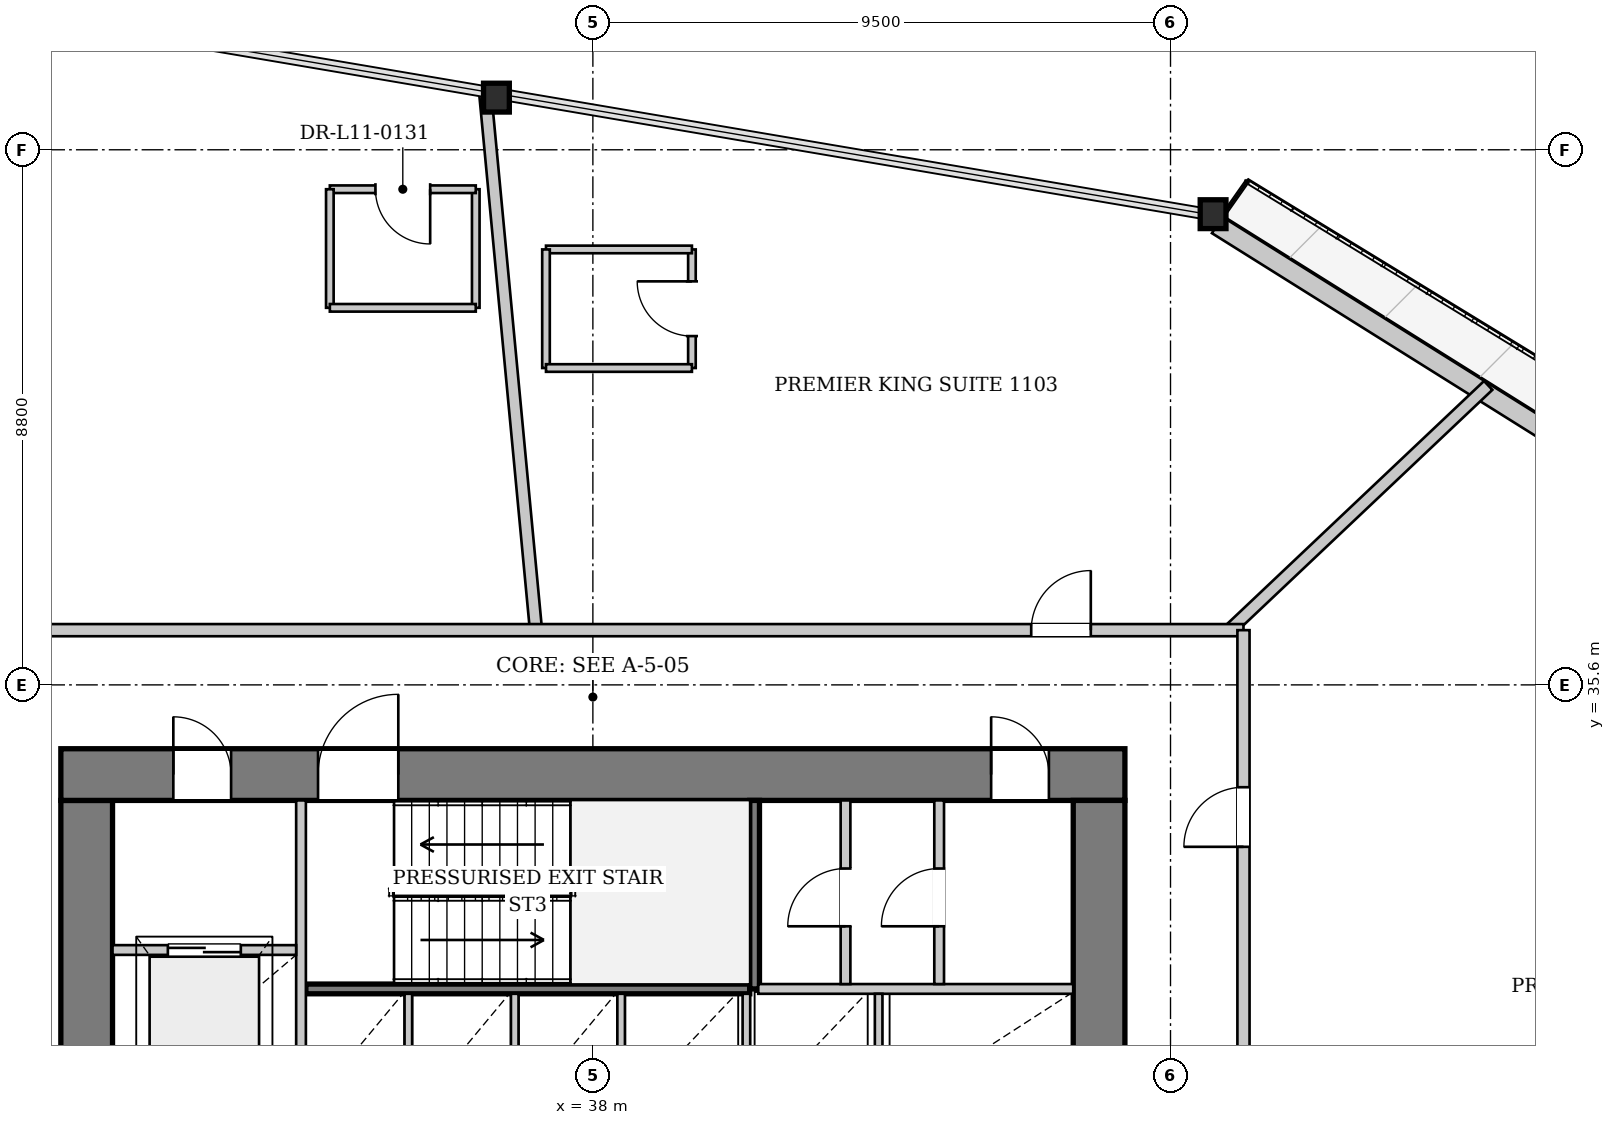
"""IFC4 building model, lengths in metres.
Left out: names, types, materials, properties, quantities, classifications, styles, units other than length and angle.
Written with IfcOpenShell. Run it as: python <this file> out.ifc"""

import sys

from ifc_helpers import new_model, si_unit, direction, frame, frame_2d, origin, origin_2d, place, context, subcontext, project, spatial, rectangle, i_section, extrude, source, transform, mapped, element, fill, save


model = new_model("IFC4")
c1 = context("Model", 3, precision=1e-05, world=origin(), true_north=direction((0.0, 1.0)))
c2 = subcontext(c1, "Body", "Model", "MODEL_VIEW")
j1 = project(units=[si_unit("LENGTHUNIT", "METRE"), si_unit("PLANEANGLEUNIT", "RADIAN")], contexts=[c1])
p1 = place(None, origin())
s1 = spatial("IfcSite", under=j1, at=p1, CompositionType="ELEMENT")
p2 = place(p1, origin())
s2 = spatial("IfcBuilding", under=s1, at=p2, CompositionType="ELEMENT")
p3 = place(p2, frame((0.0, 0.0, 47.05)))
s3 = spatial("IfcBuildingStorey", under=s2, at=p3, CompositionType="ELEMENT", Elevation=47.05)
m1 = source(origin(), c2, "Body", "SweptSolid", [
    extrude(i_section(OverallWidth=0.424, OverallDepth=0.474, WebThickness=0.043, FlangeThickness=0.068, at=origin_2d()), origin(), (0.0, 0.0, 1.0), 3.399),
])
p4 = place(p3, frame((48.351, 43.299, 0.0), z_axis=(-0.088695640975, 0.02434641481, 0.995761183898), x_axis=(-0.264702744163, -0.96433005617, 0.0)))
e1 = element("IfcColumn", 1, at=p4, inside=s3, PredefinedType="COLUMN", context=c2, shape_type="MappedRepresentation", body=[
    mapped(m1, transform((0.0, 0.0, 0.0), x_axis=(1.0, 0.0, 0.0), y_axis=(0.0, 1.0, 0.0), z_axis=(0.0, 0.0, 1.0), scale=1.0)),
])
m2 = source(origin(), c2, "Body", "SweptSolid", [
    extrude(i_section(OverallWidth=0.424, OverallDepth=0.474, WebThickness=0.043, FlangeThickness=0.068, at=origin_2d()), origin(), (0.0, 0.0, 1.0), 3.4),
])
p5 = place(p3, frame((36.57, 45.299, 0.0), z_axis=(-0.091686906918, -0.024411549219, 0.995488617396), x_axis=(0.257285839406, -0.966335343885, 0.0)))
e2 = element("IfcColumn", 2, at=p5, inside=s3, PredefinedType="COLUMN", context=c2, shape_type="MappedRepresentation", body=[
    mapped(m2, transform((0.0, 0.0, 0.0), x_axis=(1.0, 0.0, 0.0), y_axis=(0.0, 1.0, 0.0), z_axis=(0.0, 0.0, 1.0), scale=1.0)),
])
p6 = place(p3, frame((48.266, 43.164, 0.0), z_axis=(0.0, 0.0, 1.0), x_axis=(0.847483127108, -0.530822333053, 0.0)))
e3 = element("IfcWall", 3, at=p6, inside=s3, PredefinedType="SOLIDWALL", context=c2, shape_type="SweptSolid", body=[
    extrude(rectangle(XDim=23.9, YDim=0.32, at=frame_2d((11.95, 0.0))), origin(), (0.0, 0.0, 1.0), 2.592),
])
p7 = place(p6, frame((7.098, 0.0, 0.0)))
e4 = element("IfcOpeningElement", 4, at=p7, cuts=e3, PredefinedType="OPENING", context=c2, shape_type="SweptSolid", body=[
    extrude(rectangle(XDim=1.1, YDim=2.3, at=frame_2d((0.55, 1.15))), frame((0.0, 0.17, 0.0), z_axis=(0.0, -1.0, 0.0), x_axis=(1.0, 0.0, 0.0)), (0.0, 0.0, 1.0), 0.34),
])
p8 = place(p6, frame((16.786, 0.0, 0.272)))
e5 = element("IfcOpeningElement", 5, at=p8, cuts=e3, PredefinedType="OPENING", context=c2, shape_type="SweptSolid", body=[
    extrude(rectangle(XDim=1.8, YDim=2.2, at=frame_2d((0.9, 1.1))), frame((0.0, 0.17, 0.0), z_axis=(0.0, -1.0, 0.0), x_axis=(1.0, 0.0, 0.0)), (0.0, 0.0, 1.0), 0.34),
])
p9 = place(p3, frame((29.675, 19.5, 0.0), z_axis=(0.0, 0.0, 1.0), x_axis=(0.0, 1.0, 0.0)))
e6 = element("IfcWall", 6, at=p9, inside=s3, PredefinedType="SHEAR", context=c2, shape_type="SweptSolid", body=[
    extrude(rectangle(XDim=14.2, YDim=0.85, at=frame_2d((7.1, 0.0))), origin(), (0.0, 0.0, 1.0), 3.3),
])
p10 = place(p9, frame((7.42, 0.0, 0.0)))
e7 = element("IfcOpeningElement", 7, at=p10, cuts=e6, PredefinedType="OPENING", context=c2, shape_type="SweptSolid", body=[
    extrude(rectangle(XDim=1.6, YDim=2.2, at=frame_2d((0.8, 1.1))), frame((0.0, 0.435, 0.0), z_axis=(0.0, -1.0, 0.0), x_axis=(1.0, 0.0, 0.0)), (0.0, 0.0, 1.0), 0.87),
])
p11 = place(p3, frame((29.25, 34.125, 0.0), z_axis=(0.0, 0.0, 1.0), x_axis=(1.0, 0.0, 0.0)))
e8 = element("IfcWall", 8, at=p11, inside=s3, PredefinedType="SHEAR", context=c2, shape_type="SweptSolid", body=[
    extrude(rectangle(XDim=17.5, YDim=0.85, at=frame_2d((8.75, 0.0))), origin(), (0.0, 0.0, 1.0), 3.3),
])
p12 = place(p11, frame((1.85, 0.0, 0.0)))
e9 = element("IfcOpeningElement", 9, at=p12, cuts=e8, PredefinedType="OPENING", context=c2, shape_type="SweptSolid", body=[
    extrude(rectangle(XDim=0.95, YDim=2.1, at=frame_2d((0.475, 1.05))), frame((0.0, 0.435, 0.0), z_axis=(0.0, -1.0, 0.0), x_axis=(1.0, 0.0, 0.0)), (0.0, 0.0, 1.0), 0.87),
])
p13 = place(p11, frame((4.23, 0.0, 0.0)))
e10 = element("IfcOpeningElement", 10, at=p13, cuts=e8, PredefinedType="OPENING", context=c2, shape_type="SweptSolid", body=[
    extrude(rectangle(XDim=1.32, YDim=2.2, at=frame_2d((0.66, 1.1))), frame((0.0, 0.435, 0.0), z_axis=(0.0, -1.0, 0.0), x_axis=(1.0, 0.0, 0.0)), (0.0, 0.0, 1.0), 0.87),
])
p14 = place(p11, frame((15.3, 0.0, 0.0)))
e11 = element("IfcOpeningElement", 11, at=p14, cuts=e8, PredefinedType="OPENING", context=c2, shape_type="SweptSolid", body=[
    extrude(rectangle(XDim=0.95, YDim=2.1, at=frame_2d((0.475, 1.05))), frame((0.0, 0.435, 0.0), z_axis=(0.0, -1.0, 0.0), x_axis=(1.0, 0.0, 0.0)), (0.0, 0.0, 1.0), 0.87),
])
p15 = place(p3, frame((46.325, 33.7, 0.0), z_axis=(0.0, 0.0, 1.0), x_axis=(0.0, -1.0, 0.0)))
e12 = element("IfcWall", 12, at=p15, inside=s3, PredefinedType="SHEAR", context=c2, shape_type="SweptSolid", body=[
    extrude(rectangle(XDim=14.2, YDim=0.85, at=frame_2d((7.1, 0.0))), origin(), (0.0, 0.0, 1.0), 3.3),
])
p16 = place(p15, frame((5.18, 0.0, 0.0)))
e13 = element("IfcOpeningElement", 13, at=p16, cuts=e12, PredefinedType="OPENING", context=c2, shape_type="SweptSolid", body=[
    extrude(rectangle(XDim=1.6, YDim=2.2, at=frame_2d((0.8, 1.1))), frame((0.0, 0.435, 0.0), z_axis=(0.0, -1.0, 0.0), x_axis=(1.0, 0.0, 0.0)), (0.0, 0.0, 1.0), 0.87),
])
p17 = place(p3, frame((33.28, 30.6, 0.0), z_axis=(0.0, 0.0, 1.0), x_axis=(1.0, 0.0, 0.0)))
e14 = element("IfcWall", 14, at=p17, inside=s3, PredefinedType="PARTITIONING", context=c2, shape_type="SweptSolid", body=[
    extrude(rectangle(XDim=7.3, YDim=0.16, at=frame_2d((3.65, 0.0))), origin(), (0.0, 0.0, 1.0), 3.3),
])
p18 = place(p3, frame((40.66, 30.6, 0.0), z_axis=(0.0, 0.0, 1.0), x_axis=(0.0, 1.0, 0.0)))
e15 = element("IfcWall", 15, at=p18, inside=s3, PredefinedType="PARTITIONING", context=c2, shape_type="SweptSolid", body=[
    extrude(rectangle(XDim=3.1, YDim=0.16, at=frame_2d((1.55, 0.0))), origin(), (0.0, 0.0, 1.0), 3.3),
])
p19 = place(p3, frame((33.2, 28.44, 0.0), z_axis=(0.0, 0.0, 1.0), x_axis=(0.0, 1.0, 0.0)))
e16 = element("IfcWall", 16, at=p19, inside=s3, PredefinedType="PARTITIONING", context=c2, shape_type="SweptSolid", body=[
    extrude(rectangle(XDim=5.26, YDim=0.16, at=frame_2d((2.63, 0.0))), origin(), (0.0, 0.0, 1.0), 3.3),
])
p20 = place(p3, frame((30.1, 31.24, 0.0), z_axis=(0.0, 0.0, 1.0), x_axis=(1.0, 0.0, 0.0)))
e17 = element("IfcWall", 17, at=p20, inside=s3, PredefinedType="PARTITIONING", context=c2, shape_type="SweptSolid", body=[
    extrude(rectangle(XDim=3.02, YDim=0.16, at=frame_2d((1.51, 0.0))), origin(), (0.0, 0.0, 1.0), 3.3),
])
p21 = place(p20, frame((0.91, 0.0, 0.0)))
e18 = element("IfcOpeningElement", 18, at=p21, cuts=e17, PredefinedType="OPENING", context=c2, shape_type="SweptSolid", body=[
    extrude(rectangle(XDim=1.2, YDim=2.2, at=frame_2d((0.6, 1.1))), frame((0.0, 0.09, 0.0), z_axis=(0.0, -1.0, 0.0), x_axis=(1.0, 0.0, 0.0)), (0.0, 0.0, 1.0), 0.18),
])
p22 = place(p3, frame((40.72, 30.6, 0.0), z_axis=(0.0, 0.0, 1.0), x_axis=(1.0, 0.0, 0.0)))
e19 = element("IfcWall", 19, at=p22, inside=s3, PredefinedType="PARTITIONING", context=c2, shape_type="SweptSolid", body=[
    extrude(rectangle(XDim=5.18, YDim=0.16, at=frame_2d((2.59, 0.0))), origin(), (0.0, 0.0, 1.0), 3.3),
])
for number, where, z_axis, x_axis in (
    (20, (34.965, 28.6, 0.0), (0.0, 0.0, 1.0), (0.0, 1.0, 0.0)),
    (21, (36.715, 28.6, 0.0), (0.0, 0.0, 1.0), (0.0, 1.0, 0.0)),
    (22, (38.465, 28.6, 0.0), (0.0, 0.0, 1.0), (0.0, 1.0, 0.0)),
    (23, (40.525, 28.6, 0.0), (0.0, 0.0, 1.0), (0.0, 1.0, 0.0)),
    (24, (42.7, 28.6, 0.0), (0.0, 0.0, 1.0), (0.0, 1.0, 0.0)),
):
    element("IfcWall", number, at=place(p3, frame(where, z_axis=z_axis, x_axis=x_axis)), inside=s3, PredefinedType="PARTITIONING", context=c2, shape_type="SweptSolid", body=[
        extrude(rectangle(XDim=1.92, YDim=0.125, at=frame_2d((0.96, 0.0))), origin(), (0.0, 0.0, 1.0), 3.3),
    ])
p23 = place(p3, frame((42.155, 30.68, 0.0), z_axis=(0.0, 0.0, 1.0), x_axis=(0.0, 1.0, 0.0)))
e25 = element("IfcWall", 25, at=p23, inside=s3, PredefinedType="PARTITIONING", context=c2, shape_type="SweptSolid", body=[
    extrude(rectangle(XDim=3.02, YDim=0.16, at=frame_2d((1.51, 0.0))), origin(), (0.0, 0.0, 1.0), 3.3),
])
p24 = place(p23, frame((0.95, 0.0, 0.0)))
e26 = element("IfcOpeningElement", 26, at=p24, cuts=e25, PredefinedType="OPENING", context=c2, shape_type="SweptSolid", body=[
    extrude(rectangle(XDim=0.95, YDim=2.1, at=frame_2d((0.475, 1.05))), frame((0.0, 0.09, 0.0), z_axis=(0.0, -1.0, 0.0), x_axis=(1.0, 0.0, 0.0)), (0.0, 0.0, 1.0), 0.18),
])
p25 = place(p3, frame((43.695, 30.68, 0.0), z_axis=(0.0, 0.0, 1.0), x_axis=(0.0, 1.0, 0.0)))
e27 = element("IfcWall", 27, at=p25, inside=s3, PredefinedType="PARTITIONING", context=c2, shape_type="SweptSolid", body=[
    extrude(rectangle(XDim=3.02, YDim=0.16, at=frame_2d((1.51, 0.0))), origin(), (0.0, 0.0, 1.0), 3.3),
])
p26 = place(p25, frame((0.95, 0.0, 0.0)))
e28 = element("IfcOpeningElement", 28, at=p26, cuts=e27, PredefinedType="OPENING", context=c2, shape_type="SweptSolid", body=[
    extrude(rectangle(XDim=0.95, YDim=2.1, at=frame_2d((0.475, 1.05))), frame((0.0, 0.09, 0.0), z_axis=(0.0, -1.0, 0.0), x_axis=(1.0, 0.0, 0.0)), (0.0, 0.0, 1.0), 0.18),
])
p27 = place(p3, frame((48.469, 36.5, 0.0), z_axis=(0.0, 0.0, 1.0), x_axis=(0.726587633049, 0.687073803532, 0.0)))
e29 = element("IfcWall", 29, at=p27, inside=s3, PredefinedType="PARTITIONING", context=c2, shape_type="SweptSolid", body=[
    extrude(rectangle(XDim=5.857, YDim=0.2, at=frame_2d((2.929, 0.0))), origin(), (0.0, 0.0, 1.0), 3.3),
])
p28 = place(p3, frame((37.064, 36.5, 0.0), z_axis=(0.0, 0.0, 1.0), x_axis=(-0.094098210229, 0.995562919575, 0.0)))
e30 = element("IfcWall", 30, at=p28, inside=s3, PredefinedType="PARTITIONING", context=c2, shape_type="SweptSolid", body=[
    extrude(rectangle(XDim=8.865, YDim=0.2, at=frame_2d((4.433, 0.0))), origin(), (0.0, 0.0, 1.0), 3.3),
])
p29 = place(p3, frame((39.629, 40.811, 0.0), z_axis=(0.0, 0.0, 1.0), x_axis=(0.0, 1.0, 0.0)))
e31 = element("IfcWall", 31, at=p29, inside=s3, PredefinedType="PARTITIONING", context=c2, shape_type="SweptSolid", body=[
    extrude(rectangle(XDim=1.95, YDim=0.125, at=frame_2d((0.975, 0.0))), origin(), (0.0, 0.0, 1.0), 3.3),
])
p30 = place(p29, frame((0.525, 0.0, 0.0)))
e32 = element("IfcOpeningElement", 32, at=p30, cuts=e31, PredefinedType="OPENING", context=c2, shape_type="SweptSolid", body=[
    extrude(rectangle(XDim=0.9, YDim=2.1, at=frame_2d((0.45, 1.05))), frame((0.0, 0.073, 0.0), z_axis=(0.0, -1.0, 0.0), x_axis=(1.0, 0.0, 0.0)), (0.0, 0.0, 1.0), 0.145),
])
p31 = place(p3, frame((39.629, 42.761, 0.0), z_axis=(0.0, 0.0, 1.0), x_axis=(-1.0, 0.0, 0.0)))
e33 = element("IfcWall", 33, at=p31, inside=s3, PredefinedType="PARTITIONING", context=c2, shape_type="SweptSolid", body=[
    extrude(rectangle(XDim=2.4, YDim=0.125, at=frame_2d((1.2, 0.0))), origin(), (0.0, 0.0, 1.0), 3.3),
])
p32 = place(p3, frame((37.229, 42.761, 0.0), z_axis=(0.0, 0.0, 1.0), x_axis=(0.0, -1.0, 0.0)))
e34 = element("IfcWall", 34, at=p32, inside=s3, PredefinedType="PARTITIONING", context=c2, shape_type="SweptSolid", body=[
    extrude(rectangle(XDim=1.95, YDim=0.125, at=frame_2d((0.975, 0.0))), origin(), (0.0, 0.0, 1.0), 3.3),
])
p33 = place(p3, frame((37.229, 40.811, 0.0), z_axis=(0.0, 0.0, 1.0), x_axis=(1.0, 0.0, 0.0)))
e35 = element("IfcWall", 35, at=p33, inside=s3, PredefinedType="PARTITIONING", context=c2, shape_type="SweptSolid", body=[
    extrude(rectangle(XDim=2.4, YDim=0.125, at=frame_2d((1.2, 0.0))), origin(), (0.0, 0.0, 1.0), 3.3),
])
p34 = place(p3, frame((36.074, 41.801, 0.0), z_axis=(0.0, 0.0, 1.0), x_axis=(0.0, 1.0, 0.0)))
e36 = element("IfcWall", 36, at=p34, inside=s3, PredefinedType="PARTITIONING", context=c2, shape_type="SweptSolid", body=[
    extrude(rectangle(XDim=1.95, YDim=0.125, at=frame_2d((0.975, 0.0))), origin(), (0.0, 0.0, 1.0), 3.3),
])
p35 = place(p3, frame((36.074, 43.751, 0.0), z_axis=(0.0, 0.0, 1.0), x_axis=(-1.0, 0.0, 0.0)))
e37 = element("IfcWall", 37, at=p35, inside=s3, PredefinedType="PARTITIONING", context=c2, shape_type="SweptSolid", body=[
    extrude(rectangle(XDim=2.4, YDim=0.125, at=frame_2d((1.2, 0.0))), origin(), (0.0, 0.0, 1.0), 3.3),
])
p36 = place(p35, frame((0.75, 0.0, 0.0)))
e38 = element("IfcOpeningElement", 38, at=p36, cuts=e37, PredefinedType="OPENING", context=c2, shape_type="SweptSolid", body=[
    extrude(rectangle(XDim=0.9, YDim=2.1, at=frame_2d((0.45, 1.05))), frame((0.0, 0.073, 0.0), z_axis=(0.0, -1.0, 0.0), x_axis=(1.0, 0.0, 0.0)), (0.0, 0.0, 1.0), 0.145),
])
p37 = place(p3, frame((33.674, 43.751, 0.0), z_axis=(0.0, 0.0, 1.0), x_axis=(0.0, -1.0, 0.0)))
e39 = element("IfcWall", 39, at=p37, inside=s3, PredefinedType="PARTITIONING", context=c2, shape_type="SweptSolid", body=[
    extrude(rectangle(XDim=1.95, YDim=0.125, at=frame_2d((0.975, 0.0))), origin(), (0.0, 0.0, 1.0), 3.3),
])
p38 = place(p3, frame((33.674, 41.801, 0.0), z_axis=(0.0, 0.0, 1.0), x_axis=(1.0, 0.0, 0.0)))
e40 = element("IfcWall", 40, at=p38, inside=s3, PredefinedType="PARTITIONING", context=c2, shape_type="SweptSolid", body=[
    extrude(rectangle(XDim=2.4, YDim=0.125, at=frame_2d((1.2, 0.0))), origin(), (0.0, 0.0, 1.0), 3.3),
])
p39 = place(p3, frame((27.3, 36.5, 0.0), z_axis=(0.0, 0.0, 1.0), x_axis=(1.0, 0.0, 0.0)))
e41 = element("IfcWall", 41, at=p39, inside=s3, PredefinedType="PARTITIONING", context=c2, shape_type="SweptSolid", body=[
    extrude(rectangle(XDim=21.4, YDim=0.2, at=frame_2d((10.7, 0.0))), origin(), (0.0, 0.0, 1.0), 3.3),
])
p40 = place(p39, frame((17.909, 0.0, 0.0)))
e42 = element("IfcOpeningElement", 42, at=p40, cuts=e41, PredefinedType="OPENING", context=c2, shape_type="SweptSolid", body=[
    extrude(rectangle(XDim=0.98, YDim=2.15, at=frame_2d((0.49, 1.075))), frame((0.0, 0.11, 0.0), z_axis=(0.0, -1.0, 0.0), x_axis=(1.0, 0.0, 0.0)), (0.0, 0.0, 1.0), 0.22),
])
p41 = place(p3, frame((48.7, 16.7, 0.0), z_axis=(0.0, 0.0, 1.0), x_axis=(0.0, 1.0, 0.0)))
e43 = element("IfcWall", 43, at=p41, inside=s3, PredefinedType="PARTITIONING", context=c2, shape_type="SweptSolid", body=[
    extrude(rectangle(XDim=19.8, YDim=0.2, at=frame_2d((9.9, 0.0))), origin(), (0.0, 0.0, 1.0), 3.3),
])
p42 = place(p41, frame((1.545, 0.0, 0.0)))
e44 = element("IfcOpeningElement", 44, at=p42, cuts=e43, PredefinedType="OPENING", context=c2, shape_type="SweptSolid", body=[
    extrude(rectangle(XDim=0.98, YDim=2.15, at=frame_2d((0.49, 1.075))), frame((0.0, 0.11, 0.0), z_axis=(0.0, -1.0, 0.0), x_axis=(1.0, 0.0, 0.0)), (0.0, 0.0, 1.0), 0.22),
])
p43 = place(p41, frame((16.237, 0.0, 0.0)))
e45 = element("IfcOpeningElement", 45, at=p43, cuts=e43, PredefinedType="OPENING", context=c2, shape_type="SweptSolid", body=[
    extrude(rectangle(XDim=0.98, YDim=2.15, at=frame_2d((0.49, 1.075))), frame((0.0, 0.11, 0.0), z_axis=(0.0, -1.0, 0.0), x_axis=(1.0, 0.0, 0.0)), (0.0, 0.0, 1.0), 0.22),
])
m3 = source(origin(), c2, "Body", "SweptSolid", [
    extrude(rectangle(XDim=0.95, YDim=2.1, at=frame_2d((0.475, 1.05))), frame((0.0, 0.025, 0.0), z_axis=(0.0, -1.0, 0.0), x_axis=(1.0, 0.0, 0.0)), (0.0, 0.0, 1.0), 0.05),
])
p44 = place(p12, origin())
e46 = element("IfcDoor", 46, at=p44, inside=s3, OperationType="SINGLE_SWING_LEFT", PredefinedType="DOOR", context=c2, shape_type="MappedRepresentation", body=[
    mapped(m3, transform((0.0, 0.0, 0.0), x_axis=(1.0, 0.0, 0.0), y_axis=(0.0, 1.0, 0.0), z_axis=(0.0, 0.0, 1.0), scale=1.0)),
])
fill(e9, e46)
m4 = source(origin(), c2, "Body", "SweptSolid", [
    extrude(rectangle(XDim=1.32, YDim=2.2, at=frame_2d((0.66, 1.1))), frame((0.0, 0.025, 0.0), z_axis=(0.0, -1.0, 0.0), x_axis=(1.0, 0.0, 0.0)), (0.0, 0.0, 1.0), 0.05),
])
p45 = place(p13, origin())
e47 = element("IfcDoor", 47, at=p45, inside=s3, OperationType="SINGLE_SWING_RIGHT", PredefinedType="DOOR", context=c2, shape_type="MappedRepresentation", body=[
    mapped(m4, transform((0.0, 0.0, 0.0), x_axis=(1.0, 0.0, 0.0), y_axis=(0.0, 1.0, 0.0), z_axis=(0.0, 0.0, 1.0), scale=1.0)),
])
fill(e10, e47)
m5 = source(origin(), c2, "Body", "SweptSolid", [
    extrude(rectangle(XDim=1.2, YDim=2.2, at=frame_2d((0.6, 1.1))), frame((0.0, 0.025, 0.0), z_axis=(0.0, -1.0, 0.0), x_axis=(1.0, 0.0, 0.0)), (0.0, 0.0, 1.0), 0.05),
])
p46 = place(p21, origin())
e48 = element("IfcDoor", 48, at=p46, inside=s3, OperationType="DOUBLE_DOOR_SLIDING", PredefinedType="DOOR", context=c2, shape_type="MappedRepresentation", body=[
    mapped(m5, transform((0.0, 0.0, 0.0), x_axis=(1.0, 0.0, 0.0), y_axis=(0.0, 1.0, 0.0), z_axis=(0.0, 0.0, 1.0), scale=1.0)),
])
fill(e18, e48)
p47 = place(p24, origin())
e49 = element("IfcDoor", 49, at=p47, inside=s3, OperationType="SINGLE_SWING_LEFT", PredefinedType="DOOR", context=c2, shape_type="MappedRepresentation", body=[
    mapped(m3, transform((0.0, 0.0, 0.0), x_axis=(1.0, 0.0, 0.0), y_axis=(0.0, 1.0, 0.0), z_axis=(0.0, 0.0, 1.0), scale=1.0)),
])
fill(e26, e49)
p48 = place(p26, origin())
e50 = element("IfcDoor", 50, at=p48, inside=s3, OperationType="SINGLE_SWING_LEFT", PredefinedType="DOOR", context=c2, shape_type="MappedRepresentation", body=[
    mapped(m3, transform((0.0, 0.0, 0.0), x_axis=(1.0, 0.0, 0.0), y_axis=(0.0, 1.0, 0.0), z_axis=(0.0, 0.0, 1.0), scale=1.0)),
])
fill(e28, e50)
p49 = place(p14, origin())
e51 = element("IfcDoor", 51, at=p49, inside=s3, OperationType="SINGLE_SWING_LEFT", PredefinedType="DOOR", context=c2, shape_type="MappedRepresentation", body=[
    mapped(m3, transform((0.0, 0.0, 0.0), x_axis=(1.0, 0.0, 0.0), y_axis=(0.0, 1.0, 0.0), z_axis=(0.0, 0.0, 1.0), scale=1.0)),
])
fill(e11, e51)
m6 = source(origin(), c2, "Body", "SweptSolid", [
    extrude(rectangle(XDim=0.9, YDim=2.1, at=frame_2d((0.45, 1.05))), frame((0.0, 0.025, 0.0), z_axis=(0.0, -1.0, 0.0), x_axis=(1.0, 0.0, 0.0)), (0.0, 0.0, 1.0), 0.05),
])
p50 = place(p30, origin())
e52 = element("IfcDoor", 52, at=p50, inside=s3, OperationType="SINGLE_SWING_RIGHT", PredefinedType="DOOR", context=c2, shape_type="MappedRepresentation", body=[
    mapped(m6, transform((0.0, 0.0, 0.0), x_axis=(1.0, 0.0, 0.0), y_axis=(0.0, 1.0, 0.0), z_axis=(0.0, 0.0, 1.0), scale=1.0)),
])
fill(e32, e52)
p51 = place(p36, origin())
e53 = element("IfcDoor", 53, at=p51, inside=s3, OperationType="SINGLE_SWING_LEFT", PredefinedType="DOOR", context=c2, shape_type="MappedRepresentation", body=[
    mapped(m6, transform((0.0, 0.0, 0.0), x_axis=(1.0, 0.0, 0.0), y_axis=(0.0, 1.0, 0.0), z_axis=(0.0, 0.0, 1.0), scale=1.0)),
])
fill(e38, e53)
m7 = source(origin(), c2, "Body", "SweptSolid", [
    extrude(rectangle(XDim=0.98, YDim=2.15, at=frame_2d((0.49, 1.075))), frame((0.0, 0.025, 0.0), z_axis=(0.0, -1.0, 0.0), x_axis=(1.0, 0.0, 0.0)), (0.0, 0.0, 1.0), 0.05),
])
p52 = place(p40, origin())
e54 = element("IfcDoor", 54, at=p52, inside=s3, OperationType="SINGLE_SWING_RIGHT", PredefinedType="DOOR", context=c2, shape_type="MappedRepresentation", body=[
    mapped(m7, transform((0.0, 0.0, 0.0), x_axis=(1.0, 0.0, 0.0), y_axis=(0.0, 1.0, 0.0), z_axis=(0.0, 0.0, 1.0), scale=1.0)),
])
fill(e42, e54)
p53 = place(p43, origin())
e55 = element("IfcDoor", 55, at=p53, inside=s3, OperationType="SINGLE_SWING_LEFT", PredefinedType="DOOR", context=c2, shape_type="MappedRepresentation", body=[
    mapped(m7, transform((0.0, 0.0, 0.0), x_axis=(1.0, 0.0, 0.0), y_axis=(0.0, 1.0, 0.0), z_axis=(0.0, 0.0, 1.0), scale=1.0)),
])
fill(e45, e55)
save(model, sys.argv[1])
